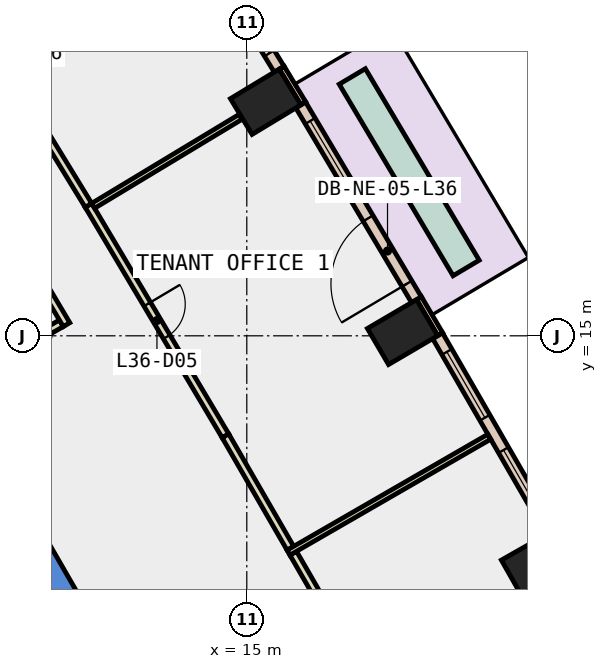
"""IFC4 building model, lengths in metres.
Left out: names, types, materials, properties, quantities, classifications, styles, units other than length and angle.
Written with IfcOpenShell. Run it as: python <this file> out.ifc"""

import sys

from ifc_helpers import new_model, si_unit, direction, frame, frame_2d, origin, origin_2d, place, context, subcontext, project, spatial, polyline, rectangle, outline, extrude, element, fill, save


model = new_model("IFC4")
c1 = context("Model", 3, precision=1e-05, world=origin(), true_north=direction((0.0, 1.0)))
c2 = subcontext(c1, "Body", "Model", "MODEL_VIEW")
j1 = project(units=[si_unit("LENGTHUNIT", "METRE"), si_unit("PLANEANGLEUNIT", "RADIAN")], contexts=[c1])
p1 = place(None, origin())
s1 = spatial("IfcSite", under=j1, at=p1, CompositionType="ELEMENT")
p2 = place(p1, origin())
s2 = spatial("IfcBuilding", under=s1, at=p2, CompositionType="ELEMENT")
p3 = place(p2, frame((0.0, 0.0, 163.4)))
s3 = spatial("IfcBuildingStorey", under=s2, at=p3, CompositionType="ELEMENT", Elevation=163.4)
for number, where, z_axis, x_axis in (
    (1, (22.623, 8.991, -0.4), (0.0, 0.0, 1.0), (-0.494, 0.869, 0.0)),
    (2, (19.099, 15.098, -0.4), (0.0, 0.0, 1.0), (-0.506, 0.863, 0.0)),
    (3, (15.496, 21.158, -0.4), (0.0, 0.0, 1.0), (-0.518, 0.855, 0.0)),
):
    element("IfcColumn", number, at=place(p3, frame(where, z_axis=z_axis, x_axis=x_axis)), inside=s3, PredefinedType="COLUMN", context=c2, shape_type="SweptSolid", body=[
        extrude(rectangle(XDim=1.1, YDim=1.5, at=origin_2d()), origin(), (0.0, 0.0, 1.0), 4.2),
    ])
p4 = place(p3, frame((0.0, 0.0, -0.4)))
e4 = element("IfcWall", 4, at=p4, inside=s3, PredefinedType="SHEAR", context=c2, shape_type="SweptSolid", body=[
    extrude(outline(polyline([(8.517, 11.748), (7.824, 11.348), (12.933, 2.5), (13.856, 2.5), (8.517, 11.748)])), origin(), (0.0, 0.0, 1.0), 4.2),
])
p5 = place(p3, frame((20.089, 15.041, 0.0), z_axis=(0.0, 0.0, 1.0), x_axis=(-0.50667077411, 0.862139621327, 0.0)))
e5 = element("IfcWall", 5, at=p5, inside=s3, PredefinedType="STANDARD", context=c2, shape_type="SweptSolid", body=[
    extrude(rectangle(XDim=1.1, YDim=0.15, at=frame_2d((0.55, 0.0))), origin(), (0.0, 0.0, 1.0), 3.8),
])
p6 = place(p3, frame((16.487, 21.115, 0.0), z_axis=(0.0, 0.0, 1.0), x_axis=(-0.518178754102, 0.855272341888, 0.0)))
e6 = element("IfcWall", 6, at=p6, inside=s3, PredefinedType="STANDARD", context=c2, shape_type="SweptSolid", body=[
    extrude(rectangle(XDim=1.1, YDim=0.15, at=frame_2d((0.55, 0.0))), origin(), (0.0, 0.0, 1.0), 3.8),
])
p7 = place(p3, frame((23.001, 9.837, 0.0), z_axis=(0.0, 0.0, 1.0), x_axis=(-0.49986421087, 0.866103787482, 0.0)))
e7 = element("IfcWall", 7, at=p7, inside=s3, PredefinedType="STANDARD", context=c2, shape_type="SweptSolid", body=[
    extrude(rectangle(XDim=5.964, YDim=0.3, at=frame_2d((2.982, 0.0))), origin(), (0.0, 0.0, 1.0), 3.8),
])
p8 = place(p7, frame((0.491, 0.0, 0.9)))
e8 = element("IfcOpeningElement", 8, at=p8, cuts=e7, PredefinedType="OPENING", context=c2, shape_type="SweptSolid", body=[
    extrude(rectangle(XDim=2.0, YDim=2.6, at=frame_2d((1.0, 1.3))), frame((0.0, 0.16, 0.0), z_axis=(0.0, -1.0, 0.0), x_axis=(1.0, 0.0, 0.0)), (0.0, 0.0, 1.0), 0.32),
])
p9 = place(p7, frame((3.473, 0.0, 0.9)))
e9 = element("IfcOpeningElement", 9, at=p9, cuts=e7, PredefinedType="OPENING", context=c2, shape_type="SweptSolid", body=[
    extrude(rectangle(XDim=2.0, YDim=2.6, at=frame_2d((1.0, 1.3))), frame((0.0, 0.16, 0.0), z_axis=(0.0, -1.0, 0.0), x_axis=(1.0, 0.0, 0.0)), (0.0, 0.0, 1.0), 0.32),
])
p10 = place(p3, frame((19.465, 15.949, 0.0), z_axis=(0.0, 0.0, 1.0), x_axis=(-0.511053317394, 0.8595490136, 0.0)))
e10 = element("IfcWall", 10, at=p10, inside=s3, PredefinedType="STANDARD", context=c2, shape_type="SweptSolid", body=[
    extrude(rectangle(XDim=5.962, YDim=0.3, at=frame_2d((2.981, 0.0))), origin(), (0.0, 0.0, 1.0), 3.8),
])
p11 = place(p10, frame((0.491, 0.0, 0.0)))
e11 = element("IfcOpeningElement", 11, at=p11, cuts=e10, PredefinedType="OPENING", context=c2, shape_type="SweptSolid", body=[
    extrude(rectangle(XDim=2.0, YDim=2.4, at=frame_2d((1.0, 1.2))), frame((0.0, 0.16, 0.0), z_axis=(0.0, -1.0, 0.0), x_axis=(1.0, 0.0, 0.0)), (0.0, 0.0, 1.0), 0.32),
])
p12 = place(p10, frame((3.472, 0.0, 0.9)))
e12 = element("IfcOpeningElement", 12, at=p12, cuts=e10, PredefinedType="OPENING", context=c2, shape_type="SweptSolid", body=[
    extrude(rectangle(XDim=2.0, YDim=2.6, at=frame_2d((1.0, 1.3))), frame((0.0, 0.16, 0.0), z_axis=(0.0, -1.0, 0.0), x_axis=(1.0, 0.0, 0.0)), (0.0, 0.0, 1.0), 0.32),
])
p13 = place(p3, frame((15.851, 22.015, 0.0), z_axis=(0.0, 0.0, 1.0), x_axis=(-0.522156898008, 0.852849443842, 0.0)))
e13 = element("IfcWall", 13, at=p13, inside=s3, PredefinedType="STANDARD", context=c2, shape_type="SweptSolid", body=[
    extrude(rectangle(XDim=5.964, YDim=0.3, at=frame_2d((2.982, 0.0))), origin(), (0.0, 0.0, 1.0), 3.8),
])
p14 = place(p13, frame((0.491, 0.0, 0.9)))
e14 = element("IfcOpeningElement", 14, at=p14, cuts=e13, PredefinedType="OPENING", context=c2, shape_type="SweptSolid", body=[
    extrude(rectangle(XDim=2.0, YDim=2.6, at=frame_2d((1.0, 1.3))), frame((0.0, 0.16, 0.0), z_axis=(0.0, -1.0, 0.0), x_axis=(1.0, 0.0, 0.0)), (0.0, 0.0, 1.0), 0.32),
])
p15 = place(p13, frame((3.473, 0.0, 0.9)))
e15 = element("IfcOpeningElement", 15, at=p15, cuts=e13, PredefinedType="OPENING", context=c2, shape_type="SweptSolid", body=[
    extrude(rectangle(XDim=2.0, YDim=2.6, at=frame_2d((1.0, 1.3))), frame((0.0, 0.16, 0.0), z_axis=(0.0, -1.0, 0.0), x_axis=(1.0, 0.0, 0.0)), (0.0, 0.0, 1.0), 0.32),
])
p16 = place(p3, frame((20.772, 16.784, 0.0), z_axis=(0.0, 0.0, 1.0), x_axis=(-0.510988922218, 0.85958729712, 0.0)))
e16 = element("IfcWall", 16, at=p16, inside=s3, PredefinedType="STANDARD", context=c2, shape_type="SweptSolid", body=[
    extrude(rectangle(XDim=5.863, YDim=0.8, at=frame_2d((2.932, 0.0))), origin(), (0.0, 0.0, 1.0), 0.8),
])
p17 = place(p3, frame((9.809, 15.15, 0.0), z_axis=(0.0, 0.0, 1.0), x_axis=(0.866479829667, 0.499212083968, 0.0)))
e17 = element("IfcWall", 17, at=p17, inside=s3, PredefinedType="PARTITIONING", context=c2, shape_type="SweptSolid", body=[
    extrude(rectangle(XDim=0.359, YDim=0.2, at=frame_2d((0.179, 0.0))), origin(), (0.0, 0.0, 1.0), 3.8),
])
p18 = place(p3, frame((10.257, 15.293, 0.0), z_axis=(0.0, 0.0, 1.0), x_axis=(-0.510974411771, 0.859595922812, 0.0)))
e18 = element("IfcWall", 18, at=p18, inside=s3, PredefinedType="PARTITIONING", context=c2, shape_type="SweptSolid", body=[
    extrude(rectangle(XDim=2.317, YDim=0.2, at=frame_2d((1.159, 0.0))), origin(), (0.0, 0.0, 1.0), 3.8),
])
p19 = place(p3, frame((16.222, 9.28, 0.0), z_axis=(0.0, 0.0, 1.0), x_axis=(0.499920397431, -0.866071357471, 0.0)))
e19 = element("IfcWall", 19, at=p19, inside=s3, PredefinedType="PARTITIONING", context=c2, shape_type="SweptSolid", body=[
    extrude(rectangle(XDim=3.417, YDim=0.2, at=frame_2d((1.708, 0.0))), origin(), (0.0, 0.0, 1.0), 3.8),
])
p20 = place(p3, frame((10.833, 18.434, 0.0), z_axis=(0.0, 0.0, 1.0), x_axis=(0.510975915649, -0.859595028852, 0.0)))
e20 = element("IfcWall", 20, at=p20, inside=s3, PredefinedType="PARTITIONING", context=c2, shape_type="SweptSolid", body=[
    extrude(rectangle(XDim=7.057, YDim=0.2, at=frame_2d((3.528, 0.0))), origin(), (0.0, 0.0, 1.0), 3.8),
])
p21 = place(p20, frame((3.028, 0.0, 0.0)))
e21 = element("IfcOpeningElement", 21, at=p21, cuts=e20, PredefinedType="OPENING", context=c2, shape_type="SweptSolid", body=[
    extrude(rectangle(XDim=1.0, YDim=2.1, at=frame_2d((0.5, 1.05))), frame((0.0, 0.11, 0.0), z_axis=(0.0, -1.0, 0.0), x_axis=(1.0, 0.0, 0.0)), (0.0, 0.0, 1.0), 0.22),
])
p22 = place(p3, frame((14.439, 12.368, 0.0), z_axis=(0.0, 0.0, 1.0), x_axis=(0.500044178772, -0.865999895656, 0.0)))
e22 = element("IfcWall", 22, at=p22, inside=s3, PredefinedType="PARTITIONING", context=c2, shape_type="SweptSolid", body=[
    extrude(rectangle(XDim=3.416, YDim=0.2, at=frame_2d((1.708, 0.0))), origin(), (0.0, 0.0, 1.0), 3.8),
])
p23 = place(p3, frame((7.226, 24.326, 0.0), z_axis=(0.0, 0.0, 1.0), x_axis=(0.52212028524, -0.852871858922, 0.0)))
e23 = element("IfcWall", 23, at=p23, inside=s3, PredefinedType="PARTITIONING", context=c2, shape_type="SweptSolid", body=[
    extrude(rectangle(XDim=6.908, YDim=0.2, at=frame_2d((3.454, 0.0))), origin(), (0.0, 0.0, 1.0), 3.8),
])
p24 = place(p23, frame((3.029, 0.0, 0.0)))
e24 = element("IfcOpeningElement", 24, at=p24, cuts=e23, PredefinedType="OPENING", context=c2, shape_type="SweptSolid", body=[
    extrude(rectangle(XDim=1.0, YDim=2.1, at=frame_2d((0.5, 1.05))), frame((0.0, 0.11, 0.0), z_axis=(0.0, -1.0, 0.0), x_axis=(1.0, 0.0, 0.0)), (0.0, 0.0, 1.0), 0.22),
])
p25 = place(p3, frame((16.098, 9.295, 0.0), z_axis=(0.0, 0.0, 1.0), x_axis=(0.866109615698, 0.499854112313, 0.0)))
e25 = element("IfcWall", 25, at=p25, inside=s3, PredefinedType="PARTITIONING", context=c2, shape_type="SweptSolid", body=[
    extrude(rectangle(XDim=6.1, YDim=0.15, at=frame_2d((3.05, 0.0))), origin(), (0.0, 0.0, 1.0), 3.8),
])
p26 = place(p3, frame((10.957, 18.421, 0.0), z_axis=(0.0, 0.0, 1.0), x_axis=(0.85624931053, 0.516562792134, 0.0)))
e26 = element("IfcWall", 26, at=p26, inside=s3, PredefinedType="PARTITIONING", context=c2, shape_type="SweptSolid", body=[
    extrude(rectangle(XDim=4.53, YDim=0.15, at=frame_2d((2.265, 0.0))), origin(), (0.0, 0.0, 1.0), 3.8),
])
p27 = place(p8, origin())
e27 = element("IfcWindow", 27, at=p27, inside=s3, PartitioningType="SINGLE_PANEL", PredefinedType="WINDOW", context=c2, shape_type="SweptSolid", body=[
    extrude(rectangle(XDim=2.0, YDim=2.6, at=frame_2d((1.0, 1.3))), frame((0.0, 0.03, 0.0), z_axis=(0.0, -1.0, 0.0), x_axis=(1.0, 0.0, 0.0)), (0.0, 0.0, 1.0), 0.06),
])
fill(e8, e27)
p28 = place(p9, origin())
e28 = element("IfcWindow", 28, at=p28, inside=s3, PartitioningType="SINGLE_PANEL", PredefinedType="WINDOW", context=c2, shape_type="SweptSolid", body=[
    extrude(rectangle(XDim=2.0, YDim=2.6, at=frame_2d((1.0, 1.3))), frame((0.0, 0.03, 0.0), z_axis=(0.0, -1.0, 0.0), x_axis=(1.0, 0.0, 0.0)), (0.0, 0.0, 1.0), 0.06),
])
fill(e9, e28)
p29 = place(p11, origin())
e29 = element("IfcDoor", 29, at=p29, inside=s3, OperationType="SLIDING_TO_LEFT", PredefinedType="DOOR", context=c2, shape_type="SweptSolid", body=[
    extrude(rectangle(XDim=2.0, YDim=2.4, at=frame_2d((1.0, 1.2))), frame((0.0, 0.025, 0.0), z_axis=(0.0, -1.0, 0.0), x_axis=(1.0, 0.0, 0.0)), (0.0, 0.0, 1.0), 0.05),
])
fill(e11, e29)
p30 = place(p12, origin())
e30 = element("IfcWindow", 30, at=p30, inside=s3, PartitioningType="SINGLE_PANEL", PredefinedType="WINDOW", context=c2, shape_type="SweptSolid", body=[
    extrude(rectangle(XDim=2.0, YDim=2.6, at=frame_2d((1.0, 1.3))), frame((0.0, 0.03, 0.0), z_axis=(0.0, -1.0, 0.0), x_axis=(1.0, 0.0, 0.0)), (0.0, 0.0, 1.0), 0.06),
])
fill(e12, e30)
p31 = place(p14, origin())
e31 = element("IfcWindow", 31, at=p31, inside=s3, PartitioningType="SINGLE_PANEL", PredefinedType="WINDOW", context=c2, shape_type="SweptSolid", body=[
    extrude(rectangle(XDim=2.0, YDim=2.6, at=frame_2d((1.0, 1.3))), frame((0.0, 0.03, 0.0), z_axis=(0.0, -1.0, 0.0), x_axis=(1.0, 0.0, 0.0)), (0.0, 0.0, 1.0), 0.06),
])
fill(e14, e31)
p32 = place(p21, origin())
e32 = element("IfcDoor", 32, at=p32, inside=s3, OperationType="SINGLE_SWING_LEFT", PredefinedType="DOOR", context=c2, shape_type="SweptSolid", body=[
    extrude(rectangle(XDim=1.0, YDim=2.1, at=frame_2d((0.5, 1.05))), frame((0.0, 0.025, 0.0), z_axis=(0.0, -1.0, 0.0), x_axis=(1.0, 0.0, 0.0)), (0.0, 0.0, 1.0), 0.05),
])
fill(e21, e32)
save(model, sys.argv[1])
